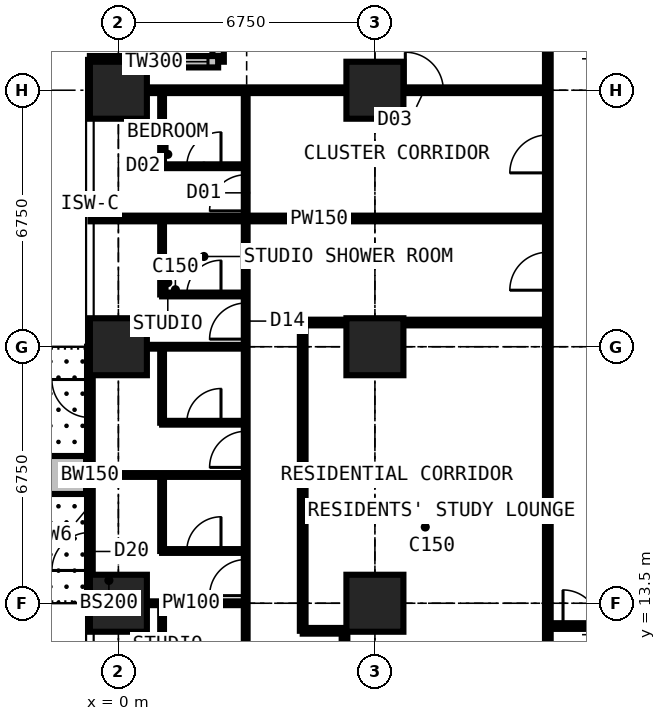
"""IFC4 building model, lengths in metres.
Left out: names, types, materials, properties, quantities, classifications, styles, units other than length and angle.
Written with IfcOpenShell. Run it as: python <this file> out.ifc"""

import sys

from ifc_helpers import new_model, si_unit, direction, frame, frame_2d, origin, origin_2d, place, context, subcontext, project, spatial, rectangle, extrude, element, fill, save


model = new_model("IFC4")
c1 = context("Model", 3, precision=1e-05, world=origin(), true_north=direction((0.0, 1.0)))
c2 = subcontext(c1, "Body", "Model", "MODEL_VIEW")
j1 = project(units=[si_unit("LENGTHUNIT", "METRE"), si_unit("PLANEANGLEUNIT", "RADIAN")], contexts=[c1])
p1 = place(None, origin())
s1 = spatial("IfcSite", under=j1, at=p1, CompositionType="ELEMENT")
p2 = place(p1, origin())
s2 = spatial("IfcBuilding", under=s1, at=p2, CompositionType="ELEMENT")
p3 = place(p2, frame((0.0, 0.0, 156.6)))
s3 = spatial("IfcBuildingStorey", under=s2, at=p3, CompositionType="ELEMENT", Elevation=156.6)
for number, where, z_axis, x_axis in (
    (1, (0.0, 13.5, 0.0), (0.0, 0.0, 1.0), (1.0, 0.0, 0.0)),
    (2, (0.0, 20.25, 0.0), (0.0, 0.0, 1.0), (1.0, 0.0, 0.0)),
    (3, (0.0, 27.0, 0.0), (0.0, 0.0, 1.0), (1.0, 0.0, 0.0)),
    (4, (6.75, 13.5, 0.0), (0.0, 0.0, 1.0), (1.0, 0.0, 0.0)),
    (5, (6.75, 20.25, 0.0), (0.0, 0.0, 1.0), (1.0, 0.0, 0.0)),
    (6, (6.75, 27.0, 0.0), (0.0, 0.0, 1.0), (1.0, 0.0, 0.0)),
):
    element("IfcColumn", number, at=place(p3, frame(where, z_axis=z_axis, x_axis=x_axis)), inside=s3, PredefinedType="COLUMN", context=c2, shape_type="SweptSolid", body=[
        extrude(rectangle(XDim=1.5, YDim=1.5, at=origin_2d()), origin(), (0.0, 0.0, 1.0), 3.6),
    ])
p4 = place(p3, frame((2.625, 31.125, 0.0), z_axis=(0.0, 0.0, 1.0), x_axis=(0.0, -1.0, 0.0)))
e7 = element("IfcWall", 7, at=p4, inside=s3, PredefinedType="SOLIDWALL", context=c2, shape_type="SweptSolid", body=[
    extrude(rectangle(XDim=3.375, YDim=0.3, at=frame_2d((1.688, 0.0))), origin(), (0.0, 0.0, 1.0), 3.375),
])
p5 = place(p4, frame((0.788, 0.0, 0.6)))
e8 = element("IfcOpeningElement", 8, at=p5, cuts=e7, PredefinedType="OPENING", context=c2, shape_type="SweptSolid", body=[
    extrude(rectangle(XDim=1.8, YDim=2.1, at=frame_2d((0.9, 1.05))), frame((0.0, 0.16, 0.0), z_axis=(0.0, -1.0, 0.0), x_axis=(1.0, 0.0, 0.0)), (0.0, 0.0, 1.0), 0.32),
])
p6 = place(p3, frame((2.625, 27.75, 0.0), z_axis=(0.0, 0.0, 1.0), x_axis=(-1.0, 0.0, 0.0)))
e9 = element("IfcWall", 9, at=p6, inside=s3, PredefinedType="SOLIDWALL", context=c2, shape_type="SweptSolid", body=[
    extrude(rectangle(XDim=3.375, YDim=0.3, at=frame_2d((1.688, 0.0))), origin(), (0.0, 0.0, 1.0), 3.375),
])
p7 = place(p6, frame((0.268, 0.0, 0.9)))
e10 = element("IfcOpeningElement", 10, at=p7, cuts=e9, PredefinedType="OPENING", context=c2, shape_type="SweptSolid", body=[
    extrude(rectangle(XDim=1.5, YDim=1.8, at=frame_2d((0.75, 0.9))), frame((0.0, 0.16, 0.0), z_axis=(0.0, -1.0, 0.0), x_axis=(1.0, 0.0, 0.0)), (0.0, 0.0, 1.0), 0.32),
])
p8 = place(p3, frame((-0.75, 13.5, 0.0), z_axis=(0.0, 0.0, 1.0), x_axis=(0.0, 1.0, 0.0)))
e11 = element("IfcWall", 11, at=p8, inside=s3, PredefinedType="SOLIDWALL", context=c2, shape_type="SweptSolid", body=[
    extrude(rectangle(XDim=6.75, YDim=0.15, at=frame_2d((3.375, 0.0))), origin(), (0.0, 0.0, 1.0), 3.375),
])
p9 = place(p8, frame((0.863, 0.0, 0.0)))
e12 = element("IfcOpeningElement", 12, at=p9, cuts=e11, PredefinedType="OPENING", context=c2, shape_type="SweptSolid", body=[
    extrude(rectangle(XDim=1.0, YDim=2.2, at=frame_2d((0.5, 1.1))), frame((0.0, 0.085, 0.0), z_axis=(0.0, -1.0, 0.0), x_axis=(1.0, 0.0, 0.0)), (0.0, 0.0, 1.0), 0.17),
])
p10 = place(p8, frame((1.975, 0.0, 0.9)))
e13 = element("IfcOpeningElement", 13, at=p10, cuts=e11, PredefinedType="OPENING", context=c2, shape_type="SweptSolid", body=[
    extrude(rectangle(XDim=1.2, YDim=1.8, at=frame_2d((0.6, 0.9))), frame((0.0, 0.085, 0.0), z_axis=(0.0, -1.0, 0.0), x_axis=(1.0, 0.0, 0.0)), (0.0, 0.0, 1.0), 0.17),
])
p11 = place(p8, frame((4.887, 0.0, 0.0)))
e14 = element("IfcOpeningElement", 14, at=p11, cuts=e11, PredefinedType="OPENING", context=c2, shape_type="SweptSolid", body=[
    extrude(rectangle(XDim=1.0, YDim=2.2, at=frame_2d((0.5, 1.1))), frame((0.0, 0.085, 0.0), z_axis=(0.0, -1.0, 0.0), x_axis=(1.0, 0.0, 0.0)), (0.0, 0.0, 1.0), 0.17),
])
p12 = place(p8, frame((3.575, 0.0, 0.9)))
e15 = element("IfcOpeningElement", 15, at=p12, cuts=e11, PredefinedType="OPENING", context=c2, shape_type="SweptSolid", body=[
    extrude(rectangle(XDim=1.2, YDim=1.8, at=frame_2d((0.6, 0.9))), frame((0.0, 0.085, 0.0), z_axis=(0.0, -1.0, 0.0), x_axis=(1.0, 0.0, 0.0)), (0.0, 0.0, 1.0), 0.17),
])
p13 = place(p3, frame((-0.85, 16.875, 0.0), z_axis=(0.0, 0.0, 1.0), x_axis=(-1.0, 0.0, 0.0)))
e16 = element("IfcWall", 16, at=p13, inside=s3, PredefinedType="USERDEFINED", context=c2, shape_type="SweptSolid", body=[
    extrude(rectangle(XDim=2.2, YDim=1.0, at=frame_2d((1.1, 0.0))), origin(), (0.0, 0.0, 1.0), 0.9),
])
p14 = place(p3, frame((-0.734, 13.5, 0.0), z_axis=(0.0, 0.0, 1.0), x_axis=(1.0, 0.0, 0.0)))
e17 = element("IfcWall", 17, at=p14, inside=s3, PredefinedType="PARTITIONING", context=c2, shape_type="SweptSolid", body=[
    extrude(rectangle(XDim=4.084, YDim=0.1, at=frame_2d((2.042, 0.0))), origin(), (0.0, 0.0, 1.0), 2.877),
])
p15 = place(p3, frame((-0.734, 16.875, 0.0), z_axis=(0.0, 0.0, 1.0), x_axis=(1.0, 0.0, 0.0)))
e18 = element("IfcWall", 18, at=p15, inside=s3, PredefinedType="PARTITIONING", context=c2, shape_type="SweptSolid", body=[
    extrude(rectangle(XDim=4.084, YDim=0.1, at=frame_2d((2.042, 0.0))), origin(), (0.0, 0.0, 1.0), 3.375),
])
p16 = place(p3, frame((-0.734, 20.25, 0.0), z_axis=(0.0, 0.0, 1.0), x_axis=(1.0, 0.0, 0.0)))
e19 = element("IfcWall", 19, at=p16, inside=s3, PredefinedType="PARTITIONING", context=c2, shape_type="SweptSolid", body=[
    extrude(rectangle(XDim=4.084, YDim=0.1, at=frame_2d((2.042, 0.0))), origin(), (0.0, 0.0, 1.0), 2.877),
])
p17 = place(p3, frame((-0.734, 23.625, 0.0), z_axis=(0.0, 0.0, 1.0), x_axis=(1.0, 0.0, 0.0)))
e20 = element("IfcWall", 20, at=p17, inside=s3, PredefinedType="PARTITIONING", context=c2, shape_type="SweptSolid", body=[
    extrude(rectangle(XDim=12.034, YDim=0.15, at=frame_2d((6.017, 0.0))), origin(), (0.0, 0.0, 1.0), 3.375),
])
p18 = place(p3, frame((-0.734, 27.0, 0.0), z_axis=(0.0, 0.0, 1.0), x_axis=(1.0, 0.0, 0.0)))
e21 = element("IfcWall", 21, at=p18, inside=s3, PredefinedType="PARTITIONING", context=c2, shape_type="SweptSolid", body=[
    extrude(rectangle(XDim=12.034, YDim=0.15, at=frame_2d((6.017, 0.0))), origin(), (0.0, 0.0, 1.0), 2.806),
])
p19 = place(p18, frame((8.284, 0.0, 0.0)))
e22 = element("IfcOpeningElement", 22, at=p19, cuts=e21, PredefinedType="OPENING", context=c2, shape_type="SweptSolid", body=[
    extrude(rectangle(XDim=1.0, YDim=2.2, at=frame_2d((0.5, 1.1))), frame((0.0, 0.085, 0.0), z_axis=(0.0, -1.0, 0.0), x_axis=(1.0, 0.0, 0.0)), (0.0, 0.0, 1.0), 0.17),
])
for number, where, z_axis, x_axis in (
    (23, (1.15, 11.5, 0.0), (0.0, 0.0, 1.0), (0.0, 1.0, 0.0)),
    (24, (1.15, 14.875, 0.0), (0.0, 0.0, 1.0), (0.0, 1.0, 0.0)),
):
    element("IfcWall", number, at=place(p3, frame(where, z_axis=z_axis, x_axis=x_axis)), inside=s3, PredefinedType="PARTITIONING", context=c2, shape_type="SweptSolid", body=[
        extrude(rectangle(XDim=2.0, YDim=0.1, at=frame_2d((1.0, 0.0))), origin(), (0.0, 0.0, 1.0), 3.375),
    ])
p20 = place(p3, frame((1.15, 14.875, 0.0), z_axis=(0.0, 0.0, 1.0), x_axis=(1.0, 0.0, 0.0)))
e25 = element("IfcWall", 25, at=p20, inside=s3, PredefinedType="PARTITIONING", context=c2, shape_type="SweptSolid", body=[
    extrude(rectangle(XDim=2.2, YDim=0.1, at=frame_2d((1.1, 0.0))), origin(), (0.0, 0.0, 1.0), 3.375),
])
p21 = place(p20, frame((0.65, 0.0, 0.0)))
e26 = element("IfcOpeningElement", 26, at=p21, cuts=e25, PredefinedType="OPENING", context=c2, shape_type="SweptSolid", body=[
    extrude(rectangle(XDim=0.9, YDim=2.2, at=frame_2d((0.45, 1.1))), frame((0.0, 0.06, 0.0), z_axis=(0.0, -1.0, 0.0), x_axis=(1.0, 0.0, 0.0)), (0.0, 0.0, 1.0), 0.12),
])
p22 = place(p3, frame((1.15, 18.25, 0.0), z_axis=(0.0, 0.0, 1.0), x_axis=(0.0, 1.0, 0.0)))
e27 = element("IfcWall", 27, at=p22, inside=s3, PredefinedType="PARTITIONING", context=c2, shape_type="SweptSolid", body=[
    extrude(rectangle(XDim=2.0, YDim=0.1, at=frame_2d((1.0, 0.0))), origin(), (0.0, 0.0, 1.0), 3.375),
])
p23 = place(p3, frame((1.15, 18.25, 0.0), z_axis=(0.0, 0.0, 1.0), x_axis=(1.0, 0.0, 0.0)))
e28 = element("IfcWall", 28, at=p23, inside=s3, PredefinedType="PARTITIONING", context=c2, shape_type="SweptSolid", body=[
    extrude(rectangle(XDim=2.2, YDim=0.1, at=frame_2d((1.1, 0.0))), origin(), (0.0, 0.0, 1.0), 3.375),
])
p24 = place(p23, frame((0.65, 0.0, 0.0)))
e29 = element("IfcOpeningElement", 29, at=p24, cuts=e28, PredefinedType="OPENING", context=c2, shape_type="SweptSolid", body=[
    extrude(rectangle(XDim=0.9, YDim=2.2, at=frame_2d((0.45, 1.1))), frame((0.0, 0.06, 0.0), z_axis=(0.0, -1.0, 0.0), x_axis=(1.0, 0.0, 0.0)), (0.0, 0.0, 1.0), 0.12),
])
p25 = place(p3, frame((1.15, 21.625, 0.0), z_axis=(0.0, 0.0, 1.0), x_axis=(0.0, 1.0, 0.0)))
e30 = element("IfcWall", 30, at=p25, inside=s3, PredefinedType="PARTITIONING", context=c2, shape_type="SweptSolid", body=[
    extrude(rectangle(XDim=2.0, YDim=0.1, at=frame_2d((1.0, 0.0))), origin(), (0.0, 0.0, 1.0), 3.375),
])
p26 = place(p3, frame((1.15, 21.625, 0.0), z_axis=(0.0, 0.0, 1.0), x_axis=(1.0, 0.0, 0.0)))
e31 = element("IfcWall", 31, at=p26, inside=s3, PredefinedType="PARTITIONING", context=c2, shape_type="SweptSolid", body=[
    extrude(rectangle(XDim=2.2, YDim=0.1, at=frame_2d((1.1, 0.0))), origin(), (0.0, 0.0, 1.0), 3.375),
])
p27 = place(p26, frame((0.65, 0.0, 0.0)))
e32 = element("IfcOpeningElement", 32, at=p27, cuts=e31, PredefinedType="OPENING", context=c2, shape_type="SweptSolid", body=[
    extrude(rectangle(XDim=0.9, YDim=2.2, at=frame_2d((0.45, 1.1))), frame((0.0, 0.06, 0.0), z_axis=(0.0, -1.0, 0.0), x_axis=(1.0, 0.0, 0.0)), (0.0, 0.0, 1.0), 0.12),
])
p28 = place(p3, frame((1.15, 25.0, 0.0), z_axis=(0.0, 0.0, 1.0), x_axis=(0.0, 1.0, 0.0)))
e33 = element("IfcWall", 33, at=p28, inside=s3, PredefinedType="PARTITIONING", context=c2, shape_type="SweptSolid", body=[
    extrude(rectangle(XDim=2.0, YDim=0.1, at=frame_2d((1.0, 0.0))), origin(), (0.0, 0.0, 1.0), 3.375),
])
p29 = place(p3, frame((1.15, 25.0, 0.0), z_axis=(0.0, 0.0, 1.0), x_axis=(1.0, 0.0, 0.0)))
e34 = element("IfcWall", 34, at=p29, inside=s3, PredefinedType="PARTITIONING", context=c2, shape_type="SweptSolid", body=[
    extrude(rectangle(XDim=2.2, YDim=0.1, at=frame_2d((1.1, 0.0))), origin(), (0.0, 0.0, 1.0), 3.375),
])
p30 = place(p29, frame((0.65, 0.0, 0.0)))
e35 = element("IfcOpeningElement", 35, at=p30, cuts=e34, PredefinedType="OPENING", context=c2, shape_type="SweptSolid", body=[
    extrude(rectangle(XDim=0.9, YDim=2.2, at=frame_2d((0.45, 1.1))), frame((0.0, 0.06, 0.0), z_axis=(0.0, -1.0, 0.0), x_axis=(1.0, 0.0, 0.0)), (0.0, 0.0, 1.0), 0.12),
])
p31 = place(p3, frame((3.35, 10.125, 0.0), z_axis=(0.0, 0.0, 1.0), x_axis=(0.0, 1.0, 0.0)))
e36 = element("IfcWall", 36, at=p31, inside=s3, PredefinedType="PARTITIONING", context=c2, shape_type="SweptSolid", body=[
    extrude(rectangle(XDim=16.875, YDim=0.1, at=frame_2d((8.438, 0.0))), origin(), (0.0, 0.0, 1.0), 3.375),
])
p32 = place(p31, frame((13.7, 0.0, 0.0)))
e37 = element("IfcOpeningElement", 37, at=p32, cuts=e36, PredefinedType="OPENING", context=c2, shape_type="SweptSolid", body=[
    extrude(rectangle(XDim=0.95, YDim=2.2, at=frame_2d((0.475, 1.1))), frame((0.0, 0.06, 0.0), z_axis=(0.0, -1.0, 0.0), x_axis=(1.0, 0.0, 0.0)), (0.0, 0.0, 1.0), 0.12),
])
p33 = place(p31, frame((0.2, 0.0, 0.0)))
e38 = element("IfcOpeningElement", 38, at=p33, cuts=e36, PredefinedType="OPENING", context=c2, shape_type="SweptSolid", body=[
    extrude(rectangle(XDim=0.95, YDim=2.2, at=frame_2d((0.475, 1.1))), frame((0.0, 0.06, 0.0), z_axis=(0.0, -1.0, 0.0), x_axis=(1.0, 0.0, 0.0)), (0.0, 0.0, 1.0), 0.12),
])
p34 = place(p31, frame((3.575, 0.0, 0.0)))
e39 = element("IfcOpeningElement", 39, at=p34, cuts=e36, PredefinedType="OPENING", context=c2, shape_type="SweptSolid", body=[
    extrude(rectangle(XDim=0.95, YDim=2.2, at=frame_2d((0.475, 1.1))), frame((0.0, 0.06, 0.0), z_axis=(0.0, -1.0, 0.0), x_axis=(1.0, 0.0, 0.0)), (0.0, 0.0, 1.0), 0.12),
])
p35 = place(p31, frame((6.95, 0.0, 0.0)))
e40 = element("IfcOpeningElement", 40, at=p35, cuts=e36, PredefinedType="OPENING", context=c2, shape_type="SweptSolid", body=[
    extrude(rectangle(XDim=0.95, YDim=2.2, at=frame_2d((0.475, 1.1))), frame((0.0, 0.06, 0.0), z_axis=(0.0, -1.0, 0.0), x_axis=(1.0, 0.0, 0.0)), (0.0, 0.0, 1.0), 0.12),
])
p36 = place(p31, frame((10.325, 0.0, 0.0)))
e41 = element("IfcOpeningElement", 41, at=p36, cuts=e36, PredefinedType="OPENING", context=c2, shape_type="SweptSolid", body=[
    extrude(rectangle(XDim=0.95, YDim=2.2, at=frame_2d((0.475, 1.1))), frame((0.0, 0.06, 0.0), z_axis=(0.0, -1.0, 0.0), x_axis=(1.0, 0.0, 0.0)), (0.0, 0.0, 1.0), 0.12),
])
p37 = place(p3, frame((4.85, 12.775, 0.0), z_axis=(0.0, 0.0, 1.0), x_axis=(0.0, 1.0, 0.0)))
e42 = element("IfcWall", 42, at=p37, inside=s3, PredefinedType="PARTITIONING", context=c2, shape_type="SweptSolid", body=[
    extrude(rectangle(XDim=8.113, YDim=0.15, at=frame_2d((4.056, 0.0))), origin(), (0.0, 0.0, 1.0), 3.375),
])
p38 = place(p3, frame((4.85, 12.775, 0.0), z_axis=(0.0, 0.0, 1.0), x_axis=(1.0, 0.0, 0.0)))
e43 = element("IfcWall", 43, at=p38, inside=s3, PredefinedType="PARTITIONING", context=c2, shape_type="SweptSolid", body=[
    extrude(rectangle(XDim=1.1, YDim=0.15, at=frame_2d((0.55, 0.0))), origin(), (0.0, 0.0, 1.0), 3.375),
])
p39 = place(p3, frame((4.85, 20.887, 0.0), z_axis=(0.0, 0.0, 1.0), x_axis=(1.0, 0.0, 0.0)))
e44 = element("IfcWall", 44, at=p39, inside=s3, PredefinedType="PARTITIONING", context=c2, shape_type="SweptSolid", body=[
    extrude(rectangle(XDim=6.45, YDim=0.15, at=frame_2d((3.225, 0.0))), origin(), (0.0, 0.0, 1.0), 3.375),
])
p40 = place(p3, frame((5.95, 10.125, 0.0), z_axis=(0.0, 0.0, 1.0), x_axis=(0.0, 1.0, 0.0)))
e45 = element("IfcWall", 45, at=p40, inside=s3, PredefinedType="PARTITIONING", context=c2, shape_type="SweptSolid", body=[
    extrude(rectangle(XDim=2.65, YDim=0.15, at=frame_2d((1.325, 0.0))), origin(), (0.0, 0.0, 1.0), 3.375),
])
p41 = place(p3, frame((11.3, 11.3, 0.0), z_axis=(0.0, 0.0, 1.0), x_axis=(0.0, 1.0, 0.0)))
e46 = element("IfcWall", 46, at=p41, inside=s3, PredefinedType="PARTITIONING", context=c2, shape_type="SweptSolid", body=[
    extrude(rectangle(XDim=19.3, YDim=0.15, at=frame_2d((9.65, 0.0))), origin(), (0.0, 0.0, 1.0), 3.375),
])
p42 = place(p41, frame((13.525, 0.0, 0.0)))
e47 = element("IfcOpeningElement", 47, at=p42, cuts=e46, PredefinedType="OPENING", context=c2, shape_type="SweptSolid", body=[
    extrude(rectangle(XDim=1.0, YDim=2.2, at=frame_2d((0.5, 1.1))), frame((0.0, 0.085, 0.0), z_axis=(0.0, -1.0, 0.0), x_axis=(1.0, 0.0, 0.0)), (0.0, 0.0, 1.0), 0.17),
])
p43 = place(p41, frame((10.438, 0.0, 0.0)))
e48 = element("IfcOpeningElement", 48, at=p43, cuts=e46, PredefinedType="OPENING", context=c2, shape_type="SweptSolid", body=[
    extrude(rectangle(XDim=1.0, YDim=2.2, at=frame_2d((0.5, 1.1))), frame((0.0, 0.085, 0.0), z_axis=(0.0, -1.0, 0.0), x_axis=(1.0, 0.0, 0.0)), (0.0, 0.0, 1.0), 0.17),
])
p44 = place(p3, frame((11.3, 12.9, 0.0), z_axis=(0.0, 0.0, 1.0), x_axis=(1.0, 0.0, 0.0)))
e49 = element("IfcWall", 49, at=p44, inside=s3, PredefinedType="PARTITIONING", context=c2, shape_type="SweptSolid", body=[
    extrude(rectangle(XDim=1.8, YDim=0.15, at=frame_2d((0.9, 0.0))), origin(), (0.0, 0.0, 1.0), 2.806),
])
p45 = place(p44, frame((0.4, 0.0, 0.0)))
e50 = element("IfcOpeningElement", 50, at=p45, cuts=e49, PredefinedType="OPENING", context=c2, shape_type="SweptSolid", body=[
    extrude(rectangle(XDim=0.95, YDim=2.2, at=frame_2d((0.475, 1.1))), frame((0.0, 0.085, 0.0), z_axis=(0.0, -1.0, 0.0), x_axis=(1.0, 0.0, 0.0)), (0.0, 0.0, 1.0), 0.17),
])
p46 = place(p7, origin())
e51 = element("IfcWindow", 51, at=p46, inside=s3, PartitioningType="SINGLE_PANEL", PredefinedType="WINDOW", context=c2, shape_type="SweptSolid", body=[
    extrude(rectangle(XDim=1.5, YDim=1.8, at=frame_2d((0.75, 0.9))), frame((0.0, 0.03, 0.0), z_axis=(0.0, -1.0, 0.0), x_axis=(1.0, 0.0, 0.0)), (0.0, 0.0, 1.0), 0.06),
])
fill(e10, e51)
p47 = place(p9, origin())
e52 = element("IfcDoor", 52, at=p47, inside=s3, OperationType="SINGLE_SWING_LEFT", PredefinedType="DOOR", context=c2, shape_type="SweptSolid", body=[
    extrude(rectangle(XDim=1.0, YDim=2.2, at=frame_2d((0.5, 1.1))), frame((0.0, 0.025, 0.0), z_axis=(0.0, -1.0, 0.0), x_axis=(1.0, 0.0, 0.0)), (0.0, 0.0, 1.0), 0.05),
])
fill(e12, e52)
p48 = place(p10, origin())
e53 = element("IfcWindow", 53, at=p48, inside=s3, PartitioningType="SINGLE_PANEL", PredefinedType="WINDOW", context=c2, shape_type="SweptSolid", body=[
    extrude(rectangle(XDim=1.2, YDim=1.8, at=frame_2d((0.6, 0.9))), frame((0.0, 0.03, 0.0), z_axis=(0.0, -1.0, 0.0), x_axis=(1.0, 0.0, 0.0)), (0.0, 0.0, 1.0), 0.06),
])
fill(e13, e53)
p49 = place(p11, origin())
e54 = element("IfcDoor", 54, at=p49, inside=s3, OperationType="SINGLE_SWING_RIGHT", PredefinedType="DOOR", context=c2, shape_type="SweptSolid", body=[
    extrude(rectangle(XDim=1.0, YDim=2.2, at=frame_2d((0.5, 1.1))), frame((0.0, 0.025, 0.0), z_axis=(0.0, -1.0, 0.0), x_axis=(1.0, 0.0, 0.0)), (0.0, 0.0, 1.0), 0.05),
])
fill(e14, e54)
p50 = place(p12, origin())
e55 = element("IfcWindow", 55, at=p50, inside=s3, PartitioningType="SINGLE_PANEL", PredefinedType="WINDOW", context=c2, shape_type="SweptSolid", body=[
    extrude(rectangle(XDim=1.2, YDim=1.8, at=frame_2d((0.6, 0.9))), frame((0.0, 0.03, 0.0), z_axis=(0.0, -1.0, 0.0), x_axis=(1.0, 0.0, 0.0)), (0.0, 0.0, 1.0), 0.06),
])
fill(e15, e55)
p51 = place(p45, origin())
e56 = element("IfcDoor", 56, at=p51, inside=s3, OperationType="SINGLE_SWING_LEFT", PredefinedType="DOOR", context=c2, shape_type="SweptSolid", body=[
    extrude(rectangle(XDim=0.95, YDim=2.2, at=frame_2d((0.475, 1.1))), frame((0.0, 0.025, 0.0), z_axis=(0.0, -1.0, 0.0), x_axis=(1.0, 0.0, 0.0)), (0.0, 0.0, 1.0), 0.05),
])
fill(e50, e56)
p52 = place(p19, origin())
e57 = element("IfcDoor", 57, at=p52, inside=s3, OperationType="SINGLE_SWING_LEFT", PredefinedType="DOOR", context=c2, shape_type="SweptSolid", body=[
    extrude(rectangle(XDim=1.0, YDim=2.2, at=frame_2d((0.5, 1.1))), frame((0.0, 0.025, 0.0), z_axis=(0.0, -1.0, 0.0), x_axis=(1.0, 0.0, 0.0)), (0.0, 0.0, 1.0), 0.05),
])
fill(e22, e57)
p53 = place(p32, origin())
e58 = element("IfcDoor", 58, at=p53, inside=s3, OperationType="SINGLE_SWING_LEFT", PredefinedType="DOOR", context=c2, shape_type="SweptSolid", body=[
    extrude(rectangle(XDim=0.95, YDim=2.2, at=frame_2d((0.475, 1.1))), frame((0.0, 0.025, 0.0), z_axis=(0.0, -1.0, 0.0), x_axis=(1.0, 0.0, 0.0)), (0.0, 0.0, 1.0), 0.05),
])
fill(e37, e58)
p54 = place(p30, origin())
e59 = element("IfcDoor", 59, at=p54, inside=s3, OperationType="SINGLE_SWING_RIGHT", PredefinedType="DOOR", context=c2, shape_type="SweptSolid", body=[
    extrude(rectangle(XDim=0.9, YDim=2.2, at=frame_2d((0.45, 1.1))), frame((0.0, 0.025, 0.0), z_axis=(0.0, -1.0, 0.0), x_axis=(1.0, 0.0, 0.0)), (0.0, 0.0, 1.0), 0.05),
])
fill(e35, e59)
p55 = place(p42, origin())
e60 = element("IfcDoor", 60, at=p55, inside=s3, OperationType="SINGLE_SWING_LEFT", PredefinedType="DOOR", context=c2, shape_type="SweptSolid", body=[
    extrude(rectangle(XDim=1.0, YDim=2.2, at=frame_2d((0.5, 1.1))), frame((0.0, 0.025, 0.0), z_axis=(0.0, -1.0, 0.0), x_axis=(1.0, 0.0, 0.0)), (0.0, 0.0, 1.0), 0.05),
])
fill(e47, e60)
p56 = place(p34, origin())
e61 = element("IfcDoor", 61, at=p56, inside=s3, OperationType="SINGLE_SWING_LEFT", PredefinedType="DOOR", context=c2, shape_type="SweptSolid", body=[
    extrude(rectangle(XDim=0.95, YDim=2.2, at=frame_2d((0.475, 1.1))), frame((0.0, 0.025, 0.0), z_axis=(0.0, -1.0, 0.0), x_axis=(1.0, 0.0, 0.0)), (0.0, 0.0, 1.0), 0.05),
])
fill(e39, e61)
p57 = place(p21, origin())
e62 = element("IfcDoor", 62, at=p57, inside=s3, OperationType="SINGLE_SWING_RIGHT", PredefinedType="DOOR", context=c2, shape_type="SweptSolid", body=[
    extrude(rectangle(XDim=0.9, YDim=2.2, at=frame_2d((0.45, 1.1))), frame((0.0, 0.025, 0.0), z_axis=(0.0, -1.0, 0.0), x_axis=(1.0, 0.0, 0.0)), (0.0, 0.0, 1.0), 0.05),
])
fill(e26, e62)
p58 = place(p35, origin())
e63 = element("IfcDoor", 63, at=p58, inside=s3, OperationType="SINGLE_SWING_LEFT", PredefinedType="DOOR", context=c2, shape_type="SweptSolid", body=[
    extrude(rectangle(XDim=0.95, YDim=2.2, at=frame_2d((0.475, 1.1))), frame((0.0, 0.025, 0.0), z_axis=(0.0, -1.0, 0.0), x_axis=(1.0, 0.0, 0.0)), (0.0, 0.0, 1.0), 0.05),
])
fill(e40, e63)
p59 = place(p24, origin())
e64 = element("IfcDoor", 64, at=p59, inside=s3, OperationType="SINGLE_SWING_RIGHT", PredefinedType="DOOR", context=c2, shape_type="SweptSolid", body=[
    extrude(rectangle(XDim=0.9, YDim=2.2, at=frame_2d((0.45, 1.1))), frame((0.0, 0.025, 0.0), z_axis=(0.0, -1.0, 0.0), x_axis=(1.0, 0.0, 0.0)), (0.0, 0.0, 1.0), 0.05),
])
fill(e29, e64)
p60 = place(p36, origin())
e65 = element("IfcDoor", 65, at=p60, inside=s3, OperationType="SINGLE_SWING_LEFT", PredefinedType="DOOR", context=c2, shape_type="SweptSolid", body=[
    extrude(rectangle(XDim=0.95, YDim=2.2, at=frame_2d((0.475, 1.1))), frame((0.0, 0.025, 0.0), z_axis=(0.0, -1.0, 0.0), x_axis=(1.0, 0.0, 0.0)), (0.0, 0.0, 1.0), 0.05),
])
fill(e41, e65)
p61 = place(p27, origin())
e66 = element("IfcDoor", 66, at=p61, inside=s3, OperationType="SINGLE_SWING_RIGHT", PredefinedType="DOOR", context=c2, shape_type="SweptSolid", body=[
    extrude(rectangle(XDim=0.9, YDim=2.2, at=frame_2d((0.45, 1.1))), frame((0.0, 0.025, 0.0), z_axis=(0.0, -1.0, 0.0), x_axis=(1.0, 0.0, 0.0)), (0.0, 0.0, 1.0), 0.05),
])
fill(e32, e66)
p62 = place(p43, origin())
e67 = element("IfcDoor", 67, at=p62, inside=s3, OperationType="SINGLE_SWING_LEFT", PredefinedType="DOOR", context=c2, shape_type="SweptSolid", body=[
    extrude(rectangle(XDim=1.0, YDim=2.2, at=frame_2d((0.5, 1.1))), frame((0.0, 0.025, 0.0), z_axis=(0.0, -1.0, 0.0), x_axis=(1.0, 0.0, 0.0)), (0.0, 0.0, 1.0), 0.05),
])
fill(e48, e67)
save(model, sys.argv[1])
